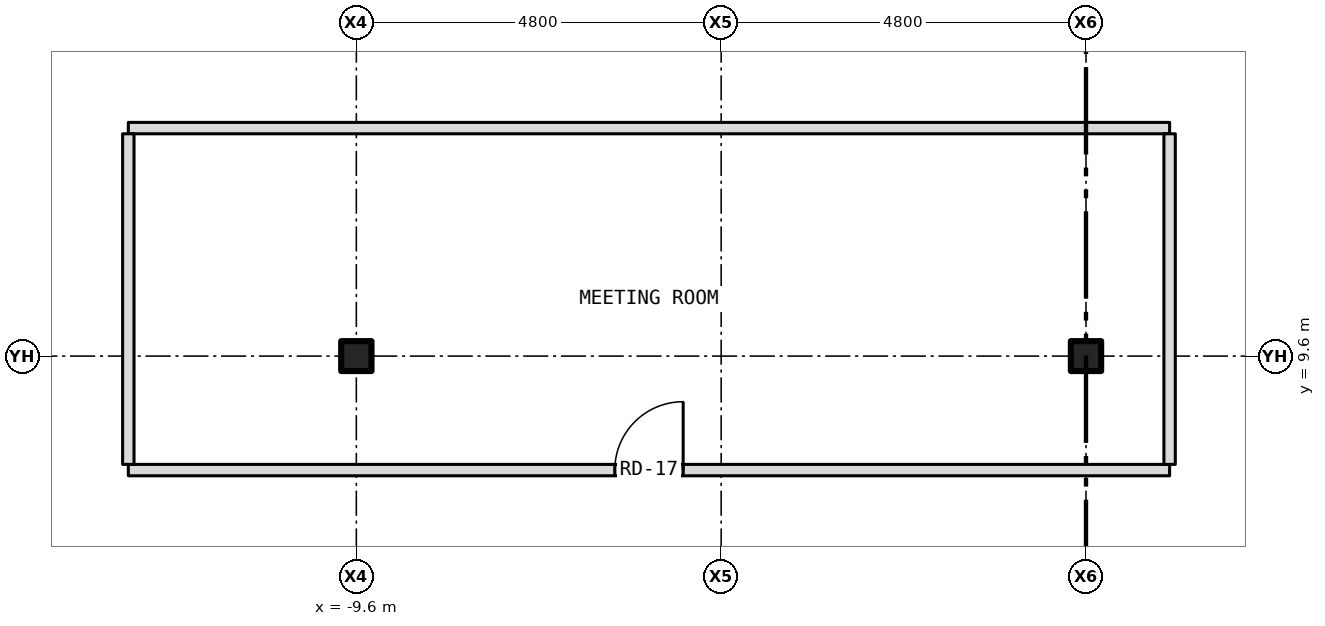
"""IFC4 building model, lengths in metres.
Left out: names, types, materials, properties, quantities, classifications, styles, units other than length and angle.
Written with IfcOpenShell. Run it as: python <this file> out.ifc"""

import sys

from ifc_helpers import new_model, si_unit, direction, frame, frame_2d, origin, origin_2d, place, context, subcontext, project, spatial, rectangle, i_section, extrude, element, fill, save


model = new_model("IFC4")
c1 = context("Model", 3, precision=1e-05, world=origin(), true_north=direction((0.0, 1.0)))
c2 = subcontext(c1, "Body", "Model", "MODEL_VIEW")
j1 = project(units=[si_unit("LENGTHUNIT", "METRE"), si_unit("PLANEANGLEUNIT", "RADIAN")], contexts=[c1])
p1 = place(None, origin())
s1 = spatial("IfcSite", under=j1, at=p1, CompositionType="ELEMENT")
p2 = place(p1, origin())
s2 = spatial("IfcBuilding", under=s1, at=p2, CompositionType="ELEMENT")
p3 = place(p2, frame((0.0, 0.0, 96.0)))
s3 = spatial("IfcBuildingStorey", under=s2, at=p3, CompositionType="ELEMENT", Elevation=96.0)
for number, where, z_axis, x_axis in (
    (1, (-9.6, 9.6, -0.15), (0.0, 0.0, 1.0), (1.0, 0.0, 0.0)),
    (2, (0.0, 9.6, -0.15), (0.0, 0.0, 1.0), (1.0, 0.0, 0.0)),
):
    element("IfcColumn", number, at=place(p3, frame(where, z_axis=z_axis, x_axis=x_axis)), inside=s3, PredefinedType="COLUMN", context=c2, shape_type="SweptSolid", body=[
        extrude(i_section(OverallWidth=0.399, OverallDepth=0.394, WebThickness=0.023, FlangeThickness=0.037, at=origin_2d()), origin(), (0.0, 0.0, 1.0), 3.5),
    ])
p4 = place(p3, frame((-12.6, 8.1, 0.0), z_axis=(0.0, 0.0, 1.0), x_axis=(1.0, 0.0, 0.0)))
e3 = element("IfcWall", 3, at=p4, inside=s3, PredefinedType="PARTITIONING", context=c2, shape_type="SweptSolid", body=[
    extrude(rectangle(XDim=13.7, YDim=0.15, at=frame_2d((6.85, 0.0))), origin(), (0.0, 0.0, 1.0), 3.35),
])
p5 = place(p4, frame((6.4, 0.0, 0.0)))
e4 = element("IfcOpeningElement", 4, at=p5, cuts=e3, PredefinedType="OPENING", context=c2, shape_type="SweptSolid", body=[
    extrude(rectangle(XDim=0.9, YDim=2.1, at=frame_2d((0.45, 1.05))), frame((0.0, 0.087, 0.0), z_axis=(0.0, -1.0, 0.0), x_axis=(1.0, 0.0, 0.0)), (0.0, 0.0, 1.0), 0.174),
])
p6 = place(p3, frame((-12.6, 12.6, 0.0), z_axis=(0.0, 0.0, 1.0), x_axis=(1.0, 0.0, 0.0)))
e5 = element("IfcWall", 5, at=p6, inside=s3, PredefinedType="PARTITIONING", context=c2, shape_type="SweptSolid", body=[
    extrude(rectangle(XDim=13.7, YDim=0.15, at=frame_2d((6.85, 0.0))), origin(), (0.0, 0.0, 1.0), 3.35),
])
for number, where, z_axis, x_axis in (
    (6, (-12.6, 8.175, 0.0), (0.0, 0.0, 1.0), (0.0, 1.0, 0.0)),
    (7, (1.1, 8.175, 0.0), (0.0, 0.0, 1.0), (0.0, 1.0, 0.0)),
):
    element("IfcWall", number, at=place(p3, frame(where, z_axis=z_axis, x_axis=x_axis)), inside=s3, PredefinedType="PARTITIONING", context=c2, shape_type="SweptSolid", body=[
        extrude(rectangle(XDim=4.35, YDim=0.15, at=frame_2d((2.175, 0.0))), origin(), (0.0, 0.0, 1.0), 3.35),
    ])
p7 = place(p5, origin())
e8 = element("IfcDoor", 8, at=p7, inside=s3, OperationType="SINGLE_SWING_RIGHT", PredefinedType="DOOR", context=c2, shape_type="SweptSolid", body=[
    extrude(rectangle(XDim=0.9, YDim=2.1, at=frame_2d((0.45, 1.05))), frame((0.0, 0.025, 0.0), z_axis=(0.0, -1.0, 0.0), x_axis=(1.0, 0.0, 0.0)), (0.0, 0.0, 1.0), 0.05),
])
fill(e4, e8)
save(model, sys.argv[1])
